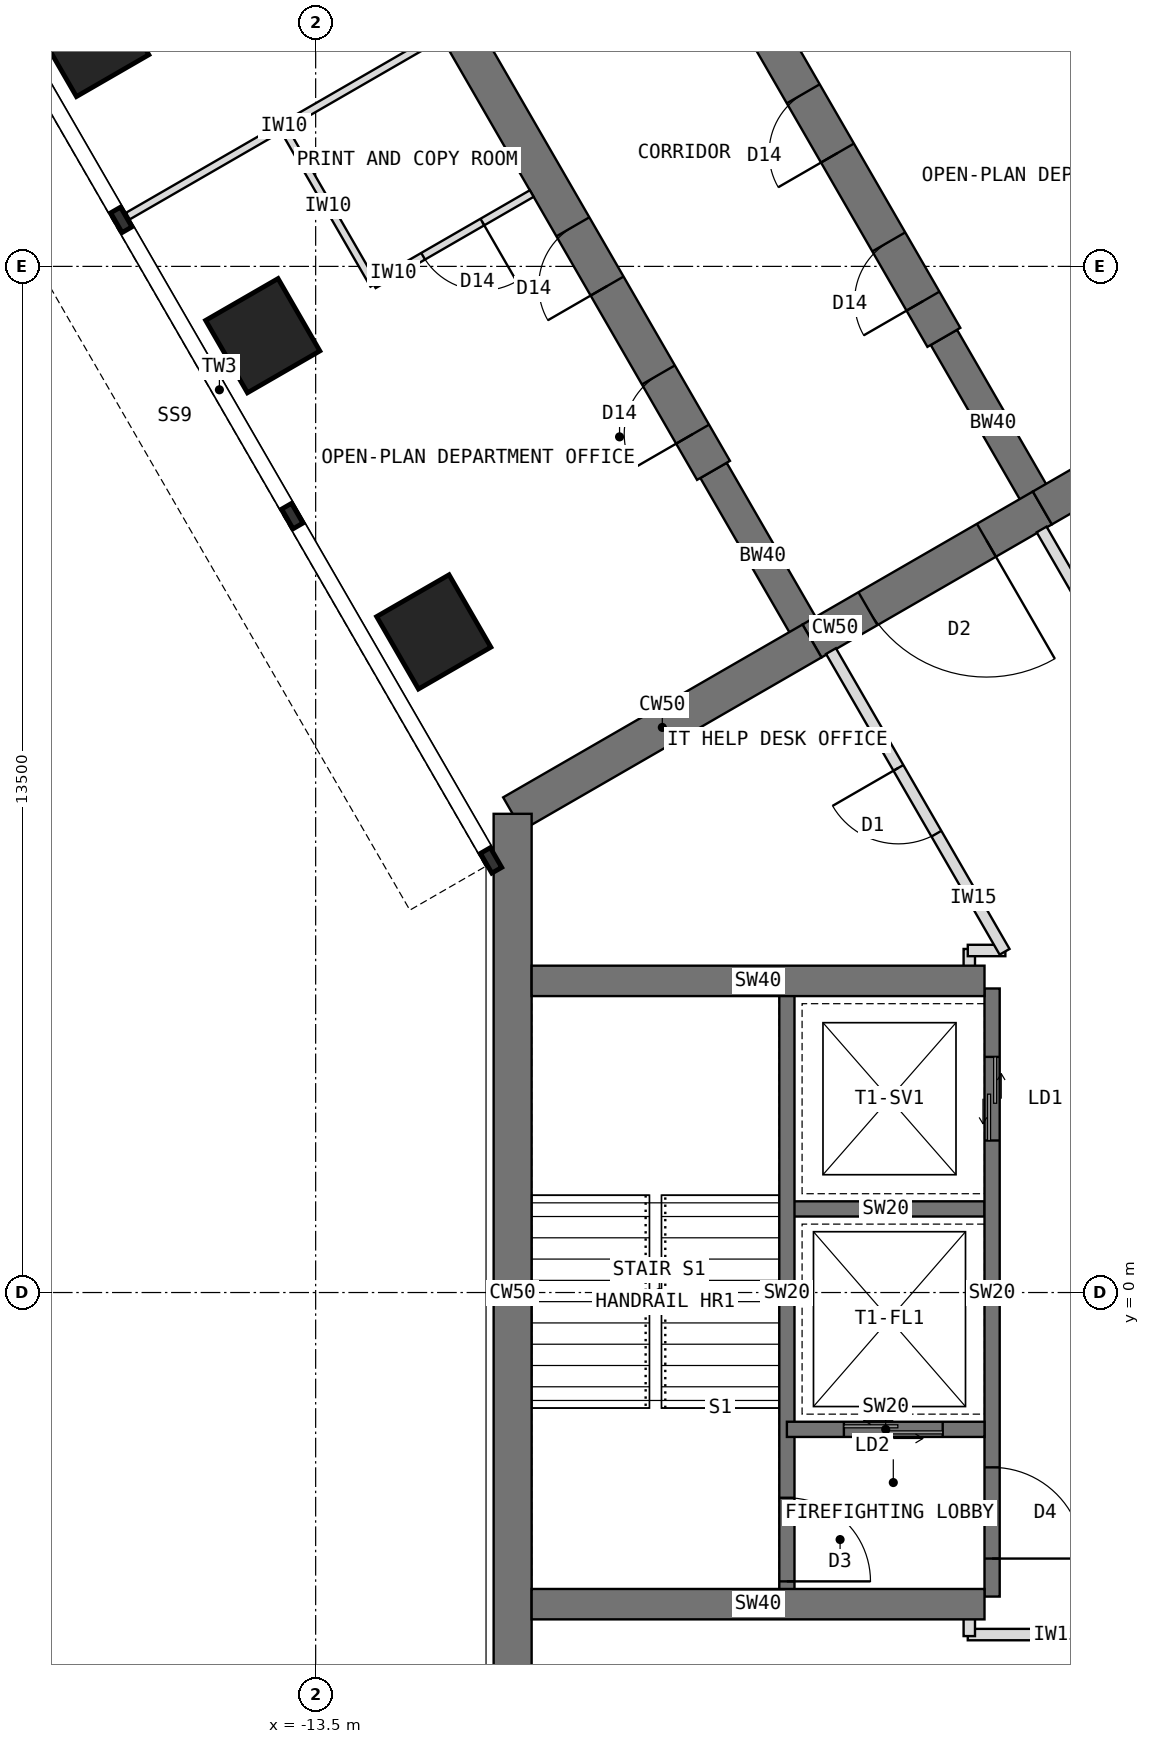
"""IFC4 building model, lengths in metres.
Left out: names, types, materials, properties, quantities, classifications, styles, units other than length and angle.
Written with IfcOpenShell. Run it as: python <this file> out.ifc"""

import sys

from ifc_helpers import new_model, si_unit, direction, frame, frame_2d, origin, origin_2d, place, context, subcontext, project, spatial, rectangle, extrude, element, fill, save


model = new_model("IFC4")
c1 = context("Model", 3, precision=1e-05, world=origin(), true_north=direction((0.0, 1.0)))
c2 = subcontext(c1, "Body", "Model", "MODEL_VIEW")
j1 = project(units=[si_unit("LENGTHUNIT", "METRE"), si_unit("PLANEANGLEUNIT", "RADIAN")], contexts=[c1])
p1 = place(None, origin())
s1 = spatial("IfcSite", under=j1, at=p1, CompositionType="ELEMENT")
p2 = place(p1, origin())
s2 = spatial("IfcBuilding", under=s1, at=p2, CompositionType="ELEMENT")
p3 = place(p2, frame((0.0, 0.0, 218.5)))
s3 = spatial("IfcBuildingStorey", under=s2, at=p3, CompositionType="ELEMENT", Elevation=218.5)
p4 = place(p3, frame((0.0, 12.596, 0.0), z_axis=(0.0, 0.0, 1.0), x_axis=(-0.866011268655, -0.500024481964, 0.0)))
e1 = element("IfcWall", 1, at=p4, inside=s3, PredefinedType="SHEAR", context=c2, shape_type="SweptSolid", body=[
    extrude(rectangle(XDim=4.548, YDim=0.5, at=frame_2d((2.274, 0.0))), origin(), (0.0, 0.0, 1.0), 4.0),
])
p5 = place(p3, frame((-3.939, 10.322, 0.0), z_axis=(0.0, 0.0, 1.0), x_axis=(-0.866019471182, -0.500010275428, 0.0)))
e2 = element("IfcWall", 2, at=p5, inside=s3, PredefinedType="SHEAR", context=c2, shape_type="SweptSolid", body=[
    extrude(rectangle(XDim=3.5, YDim=0.5, at=frame_2d((1.75, 0.0))), origin(), (0.0, 0.0, 1.0), 4.0),
])
p6 = place(p5, frame((0.85, 0.0, 0.0)))
e3 = element("IfcOpeningElement", 3, at=p6, cuts=e2, PredefinedType="OPENING", context=c2, shape_type="SweptSolid", body=[
    extrude(rectangle(XDim=1.8, YDim=2.1, at=frame_2d((0.9, 1.05))), frame((0.0, 0.26, 0.0), z_axis=(0.0, -1.0, 0.0), x_axis=(1.0, 0.0, 0.0)), (0.0, 0.0, 1.0), 0.52),
])
p7 = place(p3, frame((-6.97, 8.572, 0.0), z_axis=(0.0, 0.0, 1.0), x_axis=(-0.866034513004, -0.499984222037, 0.0)))
e4 = element("IfcWall", 4, at=p7, inside=s3, PredefinedType="SHEAR", context=c2, shape_type="SweptSolid", body=[
    extrude(rectangle(XDim=4.548, YDim=0.5, at=frame_2d((2.274, 0.0))), origin(), (0.0, 0.0, 1.0), 4.0),
])
p8 = place(p3, frame((-10.908, 6.298, 0.0), z_axis=(0.0, 0.0, 1.0), x_axis=(0.0, -1.0, 0.0)))
e5 = element("IfcWall", 5, at=p8, inside=s3, PredefinedType="SHEAR", context=c2, shape_type="SweptSolid", body=[
    extrude(rectangle(XDim=12.596, YDim=0.5, at=frame_2d((6.298, 0.0))), origin(), (0.0, 0.0, 1.0), 4.0),
])
p9 = place(p3, frame((-6.97, 8.572, 0.0), z_axis=(0.0, 0.0, 1.0), x_axis=(-0.499988811324, 0.866031863473, 0.0)))
e6 = element("IfcWall", 6, at=p9, inside=s3, PredefinedType="SHEAR", context=c2, shape_type="SweptSolid", body=[
    extrude(rectangle(XDim=2.592, YDim=0.4, at=frame_2d((1.296, 0.0))), origin(), (0.0, 0.0, 1.0), 4.0),
])
p10 = place(p3, frame((-8.266, 10.816, 0.0), z_axis=(0.0, 0.0, 1.0), x_axis=(-0.499996231654, 0.866027579429, 0.0)))
e7 = element("IfcWall", 7, at=p10, inside=s3, PredefinedType="SHEAR", context=c2, shape_type="SweptSolid", body=[
    extrude(rectangle(XDim=13.2, YDim=0.5, at=frame_2d((6.6, 0.0))), origin(), (0.0, 0.0, 1.0), 4.0),
])
p11 = place(p10, frame((0.55, 0.0, 0.0)))
e8 = element("IfcOpeningElement", 8, at=p11, cuts=e7, PredefinedType="OPENING", context=c2, shape_type="SweptSolid", body=[
    extrude(rectangle(XDim=0.9, YDim=2.1, at=frame_2d((0.45, 1.05))), frame((0.0, 0.26, 0.0), z_axis=(0.0, -1.0, 0.0), x_axis=(1.0, 0.0, 0.0)), (0.0, 0.0, 1.0), 0.52),
])
p12 = place(p10, frame((2.8, 0.0, 0.0)))
e9 = element("IfcOpeningElement", 9, at=p12, cuts=e7, PredefinedType="OPENING", context=c2, shape_type="SweptSolid", body=[
    extrude(rectangle(XDim=0.9, YDim=2.1, at=frame_2d((0.45, 1.05))), frame((0.0, 0.26, 0.0), z_axis=(0.0, -1.0, 0.0), x_axis=(1.0, 0.0, 0.0)), (0.0, 0.0, 1.0), 0.52),
])
p13 = place(p10, frame((7.3, 0.0, 0.0)))
e10 = element("IfcOpeningElement", 10, at=p13, cuts=e7, PredefinedType="OPENING", context=c2, shape_type="SweptSolid", body=[
    extrude(rectangle(XDim=0.9, YDim=2.1, at=frame_2d((0.45, 1.05))), frame((0.0, 0.26, 0.0), z_axis=(0.0, -1.0, 0.0), x_axis=(1.0, 0.0, 0.0)), (0.0, 0.0, 1.0), 0.52),
])
p14 = place(p3, frame((-3.939, 10.322, 0.0), z_axis=(0.0, 0.0, 1.0), x_axis=(-0.499918158782, 0.866072649678, 0.0)))
e11 = element("IfcWall", 11, at=p14, inside=s3, PredefinedType="SHEAR", context=c2, shape_type="SweptSolid", body=[
    extrude(rectangle(XDim=2.592, YDim=0.4, at=frame_2d((1.296, 0.0))), origin(), (0.0, 0.0, 1.0), 4.0),
])
p15 = place(p3, frame((-5.234, 12.566, 0.0), z_axis=(0.0, 0.0, 1.0), x_axis=(-0.500010103361, 0.866019570528, 0.0)))
e12 = element("IfcWall", 12, at=p15, inside=s3, PredefinedType="SHEAR", context=c2, shape_type="SweptSolid", body=[
    extrude(rectangle(XDim=13.2, YDim=0.5, at=frame_2d((6.6, 0.0))), origin(), (0.0, 0.0, 1.0), 4.0),
])
p16 = place(p15, frame((0.55, 0.0, 0.0)))
e13 = element("IfcOpeningElement", 13, at=p16, cuts=e12, PredefinedType="OPENING", context=c2, shape_type="SweptSolid", body=[
    extrude(rectangle(XDim=0.9, YDim=2.1, at=frame_2d((0.45, 1.05))), frame((0.0, 0.26, 0.0), z_axis=(0.0, -1.0, 0.0), x_axis=(1.0, 0.0, 0.0)), (0.0, 0.0, 1.0), 0.52),
])
p17 = place(p15, frame((2.8, 0.0, 0.0)))
e14 = element("IfcOpeningElement", 14, at=p17, cuts=e12, PredefinedType="OPENING", context=c2, shape_type="SweptSolid", body=[
    extrude(rectangle(XDim=0.9, YDim=2.1, at=frame_2d((0.45, 1.05))), frame((0.0, 0.26, 0.0), z_axis=(0.0, -1.0, 0.0), x_axis=(1.0, 0.0, 0.0)), (0.0, 0.0, 1.0), 0.52),
])
p18 = place(p15, frame((7.3, 0.0, 0.0)))
e15 = element("IfcOpeningElement", 15, at=p18, cuts=e12, PredefinedType="OPENING", context=c2, shape_type="SweptSolid", body=[
    extrude(rectangle(XDim=0.9, YDim=2.1, at=frame_2d((0.45, 1.05))), frame((0.0, 0.26, 0.0), z_axis=(0.0, -1.0, 0.0), x_axis=(1.0, 0.0, 0.0)), (0.0, 0.0, 1.0), 0.52),
])
for number, where, z_axis, x_axis in (
    (16, (-11.946, 8.691, 0.0), (0.0, 0.0, 1.0), (0.866, 0.5, 0.0)),
    (17, (-14.196, 12.588, 0.0), (0.0, 0.0, 1.0), (0.866, 0.5, 0.0)),
    (18, (-16.446, 16.486, 0.0), (0.0, 0.0, 1.0), (0.866, 0.5, 0.0)),
):
    element("IfcColumn", number, at=place(p3, frame(where, z_axis=z_axis, x_axis=x_axis)), inside=s3, PredefinedType="COLUMN", context=c2, shape_type="SweptSolid", body=[
        extrude(rectangle(XDim=1.1, YDim=1.1, at=origin_2d()), origin(), (0.0, 0.0, 1.0), 4.0),
    ])
p19 = place(p3, frame((-4.6, 4.0, 0.0), z_axis=(0.0, 0.0, 1.0), x_axis=(0.0, -1.0, 0.0)))
e19 = element("IfcWall", 19, at=p19, inside=s3, PredefinedType="SHEAR", context=c2, shape_type="SweptSolid", body=[
    extrude(rectangle(XDim=8.0, YDim=0.2, at=frame_2d((4.0, 0.0))), origin(), (0.0, 0.0, 1.0), 4.0),
])
p20 = place(p19, frame((6.3, 0.0, 0.0)))
e20 = element("IfcOpeningElement", 20, at=p20, cuts=e19, PredefinedType="OPENING", context=c2, shape_type="SweptSolid", body=[
    extrude(rectangle(XDim=1.2, YDim=2.1, at=frame_2d((0.6, 1.05))), frame((0.0, 0.11, 0.0), z_axis=(0.0, -1.0, 0.0), x_axis=(1.0, 0.0, 0.0)), (0.0, 0.0, 1.0), 0.22),
])
p21 = place(p19, frame((0.9, 0.0, 0.0)))
e21 = element("IfcOpeningElement", 21, at=p21, cuts=e19, PredefinedType="OPENING", context=c2, shape_type="SweptSolid", body=[
    extrude(rectangle(XDim=1.1, YDim=2.2, at=frame_2d((0.55, 1.1))), frame((0.0, 0.11, 0.0), z_axis=(0.0, -1.0, 0.0), x_axis=(1.0, 0.0, 0.0)), (0.0, 0.0, 1.0), 0.22),
])
p22 = place(p3, frame((-4.7, 1.1, 0.0), z_axis=(0.0, 0.0, 1.0), x_axis=(-1.0, 0.0, 0.0)))
e22 = element("IfcWall", 22, at=p22, inside=s3, PredefinedType="SHEAR", context=c2, shape_type="SweptSolid", body=[
    extrude(rectangle(XDim=2.6, YDim=0.2, at=frame_2d((1.3, 0.0))), origin(), (0.0, 0.0, 1.0), 4.0),
])
p23 = place(p3, frame((-4.7, -1.8, 0.0), z_axis=(0.0, 0.0, 1.0), x_axis=(-1.0, 0.0, 0.0)))
e23 = element("IfcWall", 23, at=p23, inside=s3, PredefinedType="SHEAR", context=c2, shape_type="SweptSolid", body=[
    extrude(rectangle(XDim=2.6, YDim=0.2, at=frame_2d((1.3, 0.0))), origin(), (0.0, 0.0, 1.0), 4.0),
])
p24 = place(p23, frame((0.55, 0.0, 0.0)))
e24 = element("IfcOpeningElement", 24, at=p24, cuts=e23, PredefinedType="OPENING", context=c2, shape_type="SweptSolid", body=[
    extrude(rectangle(XDim=1.3, YDim=2.2, at=frame_2d((0.65, 1.1))), frame((0.0, 0.11, 0.0), z_axis=(0.0, -1.0, 0.0), x_axis=(1.0, 0.0, 0.0)), (0.0, 0.0, 1.0), 0.22),
])
p25 = place(p3, frame((-7.3, 4.0, 0.0), z_axis=(0.0, 0.0, 1.0), x_axis=(0.0, -1.0, 0.0)))
e25 = element("IfcWall", 25, at=p25, inside=s3, PredefinedType="SHEAR", context=c2, shape_type="SweptSolid", body=[
    extrude(rectangle(XDim=8.0, YDim=0.2, at=frame_2d((4.0, 0.0))), origin(), (0.0, 0.0, 1.0), 4.0),
])
p26 = place(p25, frame((6.7, 0.0, 0.0)))
e26 = element("IfcOpeningElement", 26, at=p26, cuts=e25, PredefinedType="OPENING", context=c2, shape_type="SweptSolid", body=[
    extrude(rectangle(XDim=1.1, YDim=2.1, at=frame_2d((0.55, 1.05))), frame((0.0, 0.11, 0.0), z_axis=(0.0, -1.0, 0.0), x_axis=(1.0, 0.0, 0.0)), (0.0, 0.0, 1.0), 0.22),
])
for number, where, z_axis, x_axis in (
    (27, (-4.7, -4.1, 0.0), (0.0, 0.0, 1.0), (-1.0, 0.0, 0.0)),
    (28, (-4.7, 4.1, 0.0), (0.0, 0.0, 1.0), (-1.0, 0.0, 0.0)),
):
    element("IfcWall", number, at=place(p3, frame(where, z_axis=z_axis, x_axis=x_axis)), inside=s3, PredefinedType="SHEAR", context=c2, shape_type="SweptSolid", body=[
        extrude(rectangle(XDim=5.958, YDim=0.4, at=frame_2d((2.979, 0.0))), origin(), (0.0, 0.0, 1.0), 4.0),
    ])
p27 = place(p3, frame((-11.857, 16.537, 0.0), z_axis=(0.0, 0.0, 1.0), x_axis=(-0.866033238375, -0.499986429846, 0.0)))
e29 = element("IfcWall", 29, at=p27, inside=s3, PredefinedType="PARTITIONING", context=c2, shape_type="SweptSolid", body=[
    extrude(rectangle(XDim=4.75, YDim=0.1, at=frame_2d((2.375, 0.0))), origin(), (0.0, 0.0, 1.0), 3.8),
])
p28 = place(p3, frame((-12.736, 13.259, 0.0), z_axis=(0.0, 0.0, 1.0), x_axis=(-0.500001309137, 0.866024647952, 0.0)))
e30 = element("IfcWall", 30, at=p28, inside=s3, PredefinedType="PARTITIONING", context=c2, shape_type="SweptSolid", body=[
    extrude(rectangle(XDim=2.4, YDim=0.1, at=frame_2d((1.2, 0.0))), origin(), (0.0, 0.0, 1.0), 3.8),
])
p29 = place(p3, frame((-10.657, 14.458, 0.0), z_axis=(0.0, 0.0, 1.0), x_axis=(-0.866050077142, -0.499957262057, 0.0)))
e31 = element("IfcWall", 31, at=p29, inside=s3, PredefinedType="PARTITIONING", context=c2, shape_type="SweptSolid", body=[
    extrude(rectangle(XDim=2.4, YDim=0.1, at=frame_2d((1.2, 0.0))), origin(), (0.0, 0.0, 1.0), 3.8),
])
p30 = place(p29, frame((0.75, 0.0, 0.0)))
e32 = element("IfcOpeningElement", 32, at=p30, cuts=e31, PredefinedType="OPENING", context=c2, shape_type="SweptSolid", body=[
    extrude(rectangle(XDim=0.9, YDim=2.1, at=frame_2d((0.45, 1.05))), frame((0.0, 0.06, 0.0), z_axis=(0.0, -1.0, 0.0), x_axis=(1.0, 0.0, 0.0)), (0.0, 0.0, 1.0), 0.12),
])
p31 = place(p3, frame((-2.578, -4.5, 0.0), z_axis=(0.0, 0.0, 1.0), x_axis=(-1.0, 0.0, 0.0)))
e33 = element("IfcWall", 33, at=p31, inside=s3, PredefinedType="PARTITIONING", context=c2, shape_type="SweptSolid", body=[
    extrude(rectangle(XDim=2.342, YDim=0.15, at=frame_2d((1.171, 0.0))), origin(), (0.0, 0.0, 1.0), 3.8),
])
for number, where, z_axis, x_axis in (
    (34, (-4.9, -4.52, 0.0), (0.0, 0.0, 1.0), (0.0, 1.0, 0.0)),
    (35, (-4.9, 4.09, 0.0), (0.0, 0.0, 1.0), (0.0, 1.0, 0.0)),
):
    element("IfcWall", number, at=place(p3, frame(where, z_axis=z_axis, x_axis=x_axis)), inside=s3, PredefinedType="PARTITIONING", context=c2, shape_type="SweptSolid", body=[
        extrude(rectangle(XDim=0.43, YDim=0.15, at=frame_2d((0.215, 0.0))), origin(), (0.0, 0.0, 1.0), 3.8),
    ])
p32 = place(p3, frame((-4.92, 4.5, 0.0), z_axis=(0.0, 0.0, 1.0), x_axis=(1.0, 0.0, 0.0)))
e36 = element("IfcWall", 36, at=p32, inside=s3, PredefinedType="PARTITIONING", context=c2, shape_type="SweptSolid", body=[
    extrude(rectangle(XDim=0.494, YDim=0.15, at=frame_2d((0.247, 0.0))), origin(), (0.0, 0.0, 1.0), 3.8),
])
p33 = place(p3, frame((-4.436, 4.483, 0.0), z_axis=(0.0, 0.0, 1.0), x_axis=(-0.500001558674, 0.866024503882, 0.0)))
e37 = element("IfcWall", 37, at=p33, inside=s3, PredefinedType="PARTITIONING", context=c2, shape_type="SweptSolid", body=[
    extrude(rectangle(XDim=4.568, YDim=0.15, at=frame_2d((2.284, 0.0))), origin(), (0.0, 0.0, 1.0), 3.8),
])
p34 = place(p33, frame((1.794, 0.0, 0.0)))
e38 = element("IfcOpeningElement", 38, at=p34, cuts=e37, PredefinedType="OPENING", context=c2, shape_type="SweptSolid", body=[
    extrude(rectangle(XDim=1.0, YDim=2.1, at=frame_2d((0.5, 1.05))), frame((0.0, 0.085, 0.0), z_axis=(0.0, -1.0, 0.0), x_axis=(1.0, 0.0, 0.0)), (0.0, 0.0, 1.0), 0.17),
])
p35 = place(p3, frame((-3.948, 10.039, 0.0), z_axis=(0.0, 0.0, 1.0), x_axis=(0.500001558674, -0.866024503882, 0.0)))
e39 = element("IfcWall", 39, at=p35, inside=s3, PredefinedType="PARTITIONING", context=c2, shape_type="SweptSolid", body=[
    extrude(rectangle(XDim=4.568, YDim=0.15, at=frame_2d((2.284, 0.0))), origin(), (0.0, 0.0, 1.0), 3.8),
])
p36 = place(p35, frame((1.774, 0.0, 0.0)))
e40 = element("IfcOpeningElement", 40, at=p36, cuts=e39, PredefinedType="OPENING", context=c2, shape_type="SweptSolid", body=[
    extrude(rectangle(XDim=1.0, YDim=2.1, at=frame_2d((0.5, 1.05))), frame((0.0, 0.085, 0.0), z_axis=(0.0, -1.0, 0.0), x_axis=(1.0, 0.0, 0.0)), (0.0, 0.0, 1.0), 0.17),
])
p37 = place(p20, origin())
e41 = element("IfcDoor", 41, at=p37, inside=s3, OperationType="SINGLE_SWING_RIGHT", PredefinedType="DOOR", context=c2, shape_type="SweptSolid", body=[
    extrude(rectangle(XDim=1.2, YDim=2.1, at=frame_2d((0.6, 1.05))), frame((0.0, 0.025, 0.0), z_axis=(0.0, -1.0, 0.0), x_axis=(1.0, 0.0, 0.0)), (0.0, 0.0, 1.0), 0.05),
])
fill(e20, e41)
p38 = place(p24, origin())
e42 = element("IfcDoor", 42, at=p38, inside=s3, OperationType="DOUBLE_DOOR_SLIDING", PredefinedType="DOOR", context=c2, shape_type="SweptSolid", body=[
    extrude(rectangle(XDim=1.3, YDim=2.2, at=frame_2d((0.65, 1.1))), frame((0.0, 0.025, 0.0), z_axis=(0.0, -1.0, 0.0), x_axis=(1.0, 0.0, 0.0)), (0.0, 0.0, 1.0), 0.05),
])
fill(e24, e42)
p39 = place(p21, origin())
e43 = element("IfcDoor", 43, at=p39, inside=s3, OperationType="DOUBLE_DOOR_SLIDING", PredefinedType="DOOR", context=c2, shape_type="SweptSolid", body=[
    extrude(rectangle(XDim=1.1, YDim=2.2, at=frame_2d((0.55, 1.1))), frame((0.0, 0.025, 0.0), z_axis=(0.0, -1.0, 0.0), x_axis=(1.0, 0.0, 0.0)), (0.0, 0.0, 1.0), 0.05),
])
fill(e21, e43)
p40 = place(p26, origin())
e44 = element("IfcDoor", 44, at=p40, inside=s3, OperationType="SINGLE_SWING_RIGHT", PredefinedType="DOOR", context=c2, shape_type="SweptSolid", body=[
    extrude(rectangle(XDim=1.1, YDim=2.1, at=frame_2d((0.55, 1.05))), frame((0.0, 0.025, 0.0), z_axis=(0.0, -1.0, 0.0), x_axis=(1.0, 0.0, 0.0)), (0.0, 0.0, 1.0), 0.05),
])
fill(e26, e44)
p41 = place(p6, origin())
e45 = element("IfcDoor", 45, at=p41, inside=s3, OperationType="DOUBLE_DOOR_DOUBLE_SWING", PredefinedType="DOOR", context=c2, shape_type="SweptSolid", body=[
    extrude(rectangle(XDim=1.8, YDim=2.1, at=frame_2d((0.9, 1.05))), frame((0.0, 0.025, 0.0), z_axis=(0.0, -1.0, 0.0), x_axis=(1.0, 0.0, 0.0)), (0.0, 0.0, 1.0), 0.05),
])
fill(e3, e45)
p42 = place(p30, origin())
e46 = element("IfcDoor", 46, at=p42, inside=s3, OperationType="SINGLE_SWING_LEFT", PredefinedType="DOOR", context=c2, shape_type="SweptSolid", body=[
    extrude(rectangle(XDim=0.9, YDim=2.1, at=frame_2d((0.45, 1.05))), frame((0.0, 0.025, 0.0), z_axis=(0.0, -1.0, 0.0), x_axis=(1.0, 0.0, 0.0)), (0.0, 0.0, 1.0), 0.05),
])
fill(e32, e46)
p43 = place(p34, origin())
e47 = element("IfcDoor", 47, at=p43, inside=s3, OperationType="SINGLE_SWING_RIGHT", PredefinedType="DOOR", context=c2, shape_type="SweptSolid", body=[
    extrude(rectangle(XDim=1.0, YDim=2.1, at=frame_2d((0.5, 1.05))), frame((0.0, 0.025, 0.0), z_axis=(0.0, -1.0, 0.0), x_axis=(1.0, 0.0, 0.0)), (0.0, 0.0, 1.0), 0.05),
])
fill(e38, e47)
p44 = place(p11, origin())
e48 = element("IfcDoor", 48, at=p44, inside=s3, OperationType="SINGLE_SWING_LEFT", PredefinedType="DOOR", context=c2, shape_type="SweptSolid", body=[
    extrude(rectangle(XDim=0.9, YDim=2.1, at=frame_2d((0.45, 1.05))), frame((0.0, 0.025, 0.0), z_axis=(0.0, -1.0, 0.0), x_axis=(1.0, 0.0, 0.0)), (0.0, 0.0, 1.0), 0.05),
])
fill(e8, e48)
p45 = place(p12, origin())
e49 = element("IfcDoor", 49, at=p45, inside=s3, OperationType="SINGLE_SWING_LEFT", PredefinedType="DOOR", context=c2, shape_type="SweptSolid", body=[
    extrude(rectangle(XDim=0.9, YDim=2.1, at=frame_2d((0.45, 1.05))), frame((0.0, 0.025, 0.0), z_axis=(0.0, -1.0, 0.0), x_axis=(1.0, 0.0, 0.0)), (0.0, 0.0, 1.0), 0.05),
])
fill(e9, e49)
p46 = place(p16, origin())
e50 = element("IfcDoor", 50, at=p46, inside=s3, OperationType="SINGLE_SWING_LEFT", PredefinedType="DOOR", context=c2, shape_type="SweptSolid", body=[
    extrude(rectangle(XDim=0.9, YDim=2.1, at=frame_2d((0.45, 1.05))), frame((0.0, 0.025, 0.0), z_axis=(0.0, -1.0, 0.0), x_axis=(1.0, 0.0, 0.0)), (0.0, 0.0, 1.0), 0.05),
])
fill(e13, e50)
p47 = place(p17, origin())
e51 = element("IfcDoor", 51, at=p47, inside=s3, OperationType="SINGLE_SWING_LEFT", PredefinedType="DOOR", context=c2, shape_type="SweptSolid", body=[
    extrude(rectangle(XDim=0.9, YDim=2.1, at=frame_2d((0.45, 1.05))), frame((0.0, 0.025, 0.0), z_axis=(0.0, -1.0, 0.0), x_axis=(1.0, 0.0, 0.0)), (0.0, 0.0, 1.0), 0.05),
])
fill(e14, e51)
save(model, sys.argv[1])
